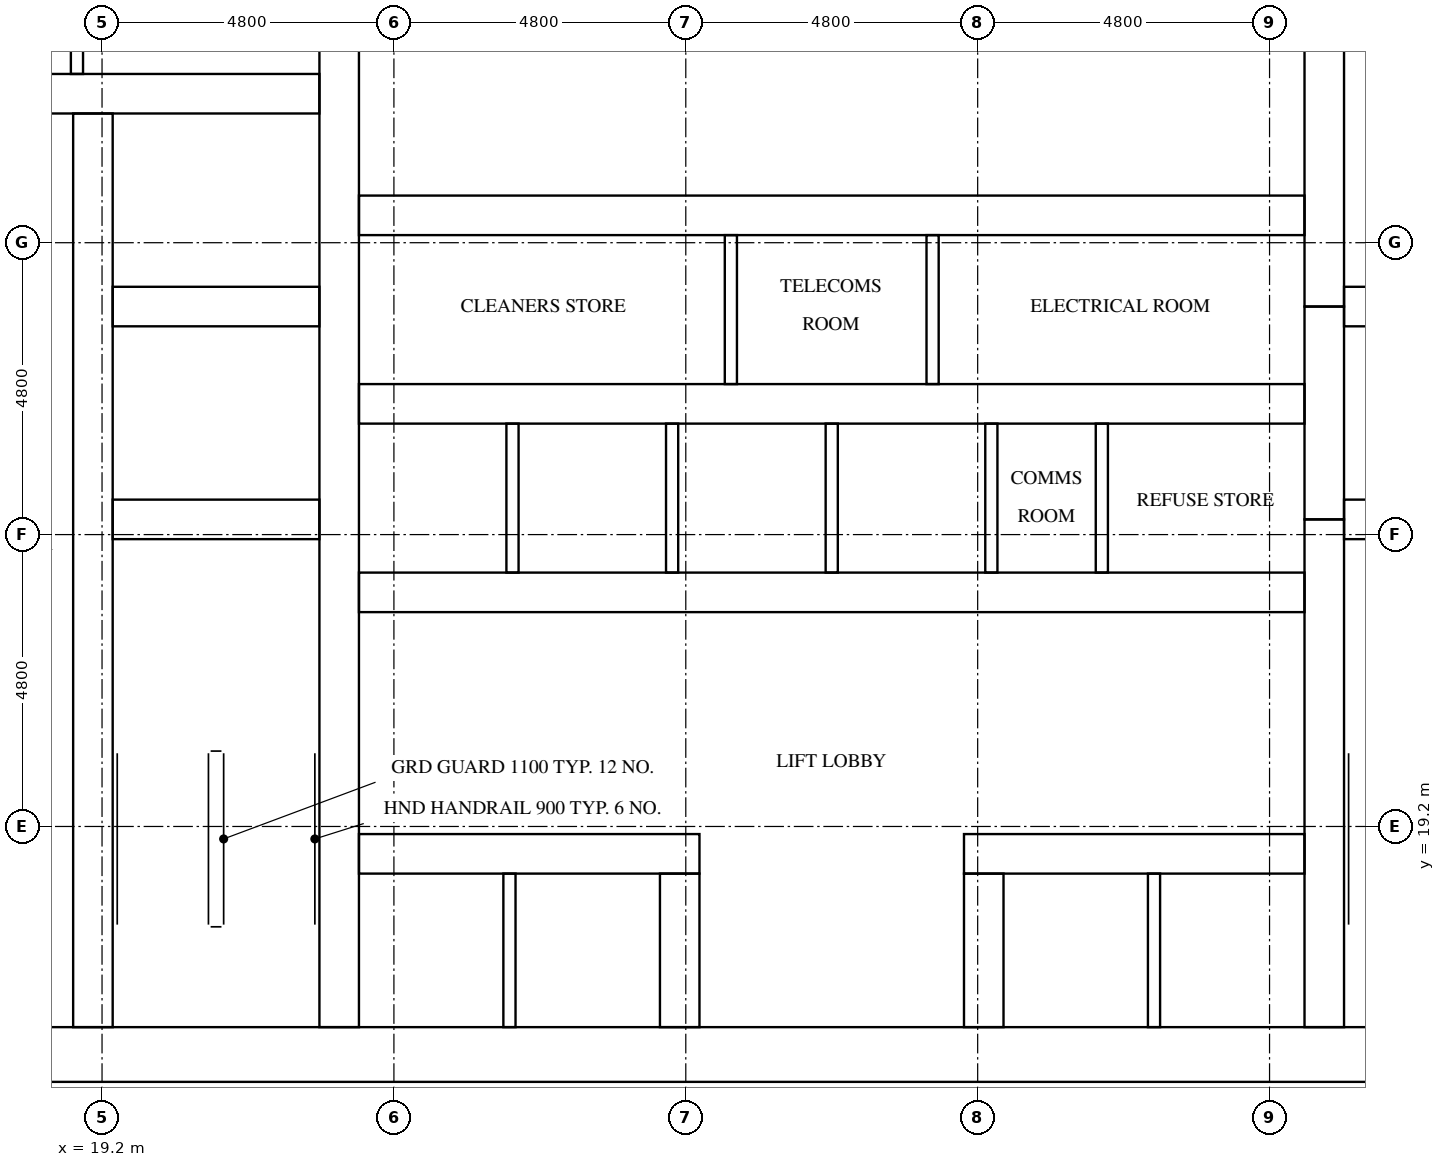
"""IFC4 building model, lengths in metres.
Left out: names, types, materials, properties, quantities, classifications, styles, units other than length and angle.
Written with IfcOpenShell. Run it as: python <this file> out.ifc"""

import sys

from ifc_helpers import new_model, si_unit, direction, frame, frame_2d, origin, place, context, subcontext, project, spatial, rectangle, extrude, element, fill, save


model = new_model("IFC4")
c1 = context("Model", 3, precision=1e-05, world=origin(), true_north=direction((0.0, 1.0)))
c2 = subcontext(c1, "Body", "Model", "MODEL_VIEW")
j1 = project(units=[si_unit("LENGTHUNIT", "METRE"), si_unit("PLANEANGLEUNIT", "RADIAN")], contexts=[c1])
p1 = place(None, origin())
s1 = spatial("IfcSite", under=j1, at=p1, CompositionType="ELEMENT")
p2 = place(p1, origin())
s2 = spatial("IfcBuilding", under=s1, at=p2, CompositionType="ELEMENT")
p3 = place(p2, frame((0.0, 0.0, 76.8)))
s3 = spatial("IfcBuildingStorey", under=s2, at=p3, CompositionType="ELEMENT", Elevation=76.8)
p4 = place(p3, frame((15.0, 15.45, 0.0), z_axis=(0.0, 0.0, 1.0), x_axis=(1.0, 0.0, 0.0)))
e1 = element("IfcWall", 1, at=p4, inside=s3, PredefinedType="SHEAR", context=c2, shape_type="SweptSolid", body=[
    extrude(rectangle(XDim=32.4, YDim=0.9, at=frame_2d((16.2, 0.0))), origin(), (0.0, 0.0, 1.0), 3.2),
])
p5 = place(p4, frame((15.3, 0.0, 0.0)))
e2 = element("IfcOpeningElement", 2, at=p5, cuts=e1, PredefinedType="OPENING", context=c2, shape_type="SweptSolid", body=[
    extrude(rectangle(XDim=1.8, YDim=2.1, at=frame_2d((0.9, 1.05))), frame((0.0, 0.46, 0.0), z_axis=(0.0, -1.0, 0.0), x_axis=(1.0, 0.0, 0.0)), (0.0, 0.0, 1.0), 0.92),
])
p6 = place(p3, frame((19.05, 15.9, 0.0), z_axis=(0.0, 0.0, 1.0), x_axis=(0.0, 1.0, 0.0)))
e3 = element("IfcWall", 3, at=p6, inside=s3, PredefinedType="SHEAR", context=c2, shape_type="SweptSolid", body=[
    extrude(rectangle(XDim=15.025, YDim=0.65, at=frame_2d((7.513, 0.0))), origin(), (0.0, 0.0, 1.0), 3.2),
])
p7 = place(p6, frame((9.55, 0.0, 0.0)))
e4 = element("IfcOpeningElement", 4, at=p7, cuts=e3, PredefinedType="OPENING", context=c2, shape_type="SweptSolid", body=[
    extrude(rectangle(XDim=1.1, YDim=2.1, at=frame_2d((0.55, 1.05))), frame((0.0, 0.335, 0.0), z_axis=(0.0, -1.0, 0.0), x_axis=(1.0, 0.0, 0.0)), (0.0, 0.0, 1.0), 0.67),
])
p8 = place(p6, frame((13.05, 0.0, 0.0)))
e5 = element("IfcOpeningElement", 5, at=p8, cuts=e3, PredefinedType="OPENING", context=c2, shape_type="SweptSolid", body=[
    extrude(rectangle(XDim=1.1, YDim=2.1, at=frame_2d((0.55, 1.05))), frame((0.0, 0.335, 0.0), z_axis=(0.0, -1.0, 0.0), x_axis=(1.0, 0.0, 0.0)), (0.0, 0.0, 1.0), 0.67),
])
p9 = place(p6, frame((0.3, 0.0, 0.0)))
e6 = element("IfcOpeningElement", 6, at=p9, cuts=e3, PredefinedType="OPENING", context=c2, shape_type="SweptSolid", body=[
    extrude(rectangle(XDim=1.2, YDim=2.1, at=frame_2d((0.6, 1.05))), frame((0.0, 0.335, 0.0), z_axis=(0.0, -1.0, 0.0), x_axis=(1.0, 0.0, 0.0)), (0.0, 0.0, 1.0), 0.67),
])
p10 = place(p3, frame((23.1, 15.9, 0.0), z_axis=(0.0, 0.0, 1.0), x_axis=(0.0, 1.0, 0.0)))
e7 = element("IfcWall", 7, at=p10, inside=s3, PredefinedType="SHEAR", context=c2, shape_type="SweptSolid", body=[
    extrude(rectangle(XDim=21.0, YDim=0.65, at=frame_2d((10.5, 0.0))), origin(), (0.0, 0.0, 1.0), 3.2),
])
p11 = place(p3, frame((39.3, 15.9, 0.0), z_axis=(0.0, 0.0, 1.0), x_axis=(0.0, 1.0, 0.0)))
e8 = element("IfcWall", 8, at=p11, inside=s3, PredefinedType="SHEAR", context=c2, shape_type="SweptSolid", body=[
    extrude(rectangle(XDim=8.35, YDim=0.65, at=frame_2d((4.175, 0.0))), origin(), (0.0, 0.0, 1.0), 3.2),
])
p12 = place(p3, frame((39.3, 24.25, 0.0), z_axis=(0.0, 0.0, 1.0), x_axis=(0.0, 1.0, 0.0)))
e9 = element("IfcWall", 9, at=p12, inside=s3, PredefinedType="SHEAR", context=c2, shape_type="SweptSolid", body=[
    extrude(rectangle(XDim=3.5, YDim=0.65, at=frame_2d((1.75, 0.0))), origin(), (0.0, 0.0, 1.0), 3.2),
])
p13 = place(p3, frame((39.3, 27.75, 0.0), z_axis=(0.0, 0.0, 1.0), x_axis=(0.0, 1.0, 0.0)))
e10 = element("IfcWall", 10, at=p13, inside=s3, PredefinedType="SHEAR", context=c2, shape_type="SweptSolid", body=[
    extrude(rectangle(XDim=9.15, YDim=0.65, at=frame_2d((4.575, 0.0))), origin(), (0.0, 0.0, 1.0), 3.2),
])
for number, where, z_axis, x_axis in (
    (11, (19.375, 24.25, 0.0), (0.0, 0.0, 1.0), (1.0, 0.0, 0.0)),
    (12, (19.375, 27.75, 0.0), (0.0, 0.0, 1.0), (1.0, 0.0, 0.0)),
):
    element("IfcWall", number, at=place(p3, frame(where, z_axis=z_axis, x_axis=x_axis)), inside=s3, PredefinedType="SHEAR", context=c2, shape_type="SweptSolid", body=[
        extrude(rectangle(XDim=3.4, YDim=0.65, at=frame_2d((1.7, 0.0))), origin(), (0.0, 0.0, 1.0), 3.2),
    ])
p14 = place(p3, frame((15.9, 31.25, 0.0), z_axis=(0.0, 0.0, 1.0), x_axis=(1.0, 0.0, 0.0)))
e13 = element("IfcWall", 13, at=p14, inside=s3, PredefinedType="SHEAR", context=c2, shape_type="SweptSolid", body=[
    extrude(rectangle(XDim=6.875, YDim=0.65, at=frame_2d((3.438, 0.0))), origin(), (0.0, 0.0, 1.0), 3.2),
])
for number, where, z_axis, x_axis in (
    (14, (39.625, 24.25, 0.0), (0.0, 0.0, 1.0), (1.0, 0.0, 0.0)),
    (15, (39.625, 27.75, 0.0), (0.0, 0.0, 1.0), (1.0, 0.0, 0.0)),
):
    element("IfcWall", number, at=place(p3, frame(where, z_axis=z_axis, x_axis=x_axis)), inside=s3, PredefinedType="SHEAR", context=c2, shape_type="SweptSolid", body=[
        extrude(rectangle(XDim=3.4, YDim=0.65, at=frame_2d((1.7, 0.0))), origin(), (0.0, 0.0, 1.0), 3.2),
    ])
p15 = place(p3, frame((23.425, 18.75, 0.0), z_axis=(0.0, 0.0, 1.0), x_axis=(1.0, 0.0, 0.0)))
e16 = element("IfcWall", 16, at=p15, inside=s3, PredefinedType="SHEAR", context=c2, shape_type="SweptSolid", body=[
    extrude(rectangle(XDim=5.6, YDim=0.65, at=frame_2d((2.8, 0.0))), origin(), (0.0, 0.0, 1.0), 3.2),
])
p16 = place(p15, frame((0.637, 0.0, 0.0)))
e17 = element("IfcOpeningElement", 17, at=p16, cuts=e16, PredefinedType="OPENING", context=c2, shape_type="SweptSolid", body=[
    extrude(rectangle(XDim=1.1, YDim=2.1, at=frame_2d((0.55, 1.05))), frame((0.0, 0.335, 0.0), z_axis=(0.0, -1.0, 0.0), x_axis=(1.0, 0.0, 0.0)), (0.0, 0.0, 1.0), 0.67),
])
p17 = place(p15, frame((3.212, 0.0, 0.0)))
e18 = element("IfcOpeningElement", 18, at=p17, cuts=e16, PredefinedType="OPENING", context=c2, shape_type="SweptSolid", body=[
    extrude(rectangle(XDim=1.1, YDim=2.1, at=frame_2d((0.55, 1.05))), frame((0.0, 0.335, 0.0), z_axis=(0.0, -1.0, 0.0), x_axis=(1.0, 0.0, 0.0)), (0.0, 0.0, 1.0), 0.67),
])
p18 = place(p3, frame((33.375, 18.75, 0.0), z_axis=(0.0, 0.0, 1.0), x_axis=(1.0, 0.0, 0.0)))
e19 = element("IfcWall", 19, at=p18, inside=s3, PredefinedType="SHEAR", context=c2, shape_type="SweptSolid", body=[
    extrude(rectangle(XDim=5.6, YDim=0.65, at=frame_2d((2.8, 0.0))), origin(), (0.0, 0.0, 1.0), 3.2),
])
p19 = place(p18, frame((1.288, 0.0, 0.0)))
e20 = element("IfcOpeningElement", 20, at=p19, cuts=e19, PredefinedType="OPENING", context=c2, shape_type="SweptSolid", body=[
    extrude(rectangle(XDim=1.1, YDim=2.1, at=frame_2d((0.55, 1.05))), frame((0.0, 0.335, 0.0), z_axis=(0.0, -1.0, 0.0), x_axis=(1.0, 0.0, 0.0)), (0.0, 0.0, 1.0), 0.67),
])
p20 = place(p18, frame((3.863, 0.0, 0.0)))
e21 = element("IfcOpeningElement", 21, at=p20, cuts=e19, PredefinedType="OPENING", context=c2, shape_type="SweptSolid", body=[
    extrude(rectangle(XDim=1.1, YDim=2.1, at=frame_2d((0.55, 1.05))), frame((0.0, 0.335, 0.0), z_axis=(0.0, -1.0, 0.0), x_axis=(1.0, 0.0, 0.0)), (0.0, 0.0, 1.0), 0.67),
])
p21 = place(p3, frame((23.425, 23.05, 0.0), z_axis=(0.0, 0.0, 1.0), x_axis=(1.0, 0.0, 0.0)))
e22 = element("IfcWall", 22, at=p21, inside=s3, PredefinedType="SHEAR", context=c2, shape_type="SweptSolid", body=[
    extrude(rectangle(XDim=15.55, YDim=0.65, at=frame_2d((7.775, 0.0))), origin(), (0.0, 0.0, 1.0), 3.2),
])
p22 = place(p21, frame((0.663, 0.0, 0.0)))
e23 = element("IfcOpeningElement", 23, at=p22, cuts=e22, PredefinedType="OPENING", context=c2, shape_type="SweptSolid", body=[
    extrude(rectangle(XDim=1.1, YDim=2.1, at=frame_2d((0.55, 1.05))), frame((0.0, 0.335, 0.0), z_axis=(0.0, -1.0, 0.0), x_axis=(1.0, 0.0, 0.0)), (0.0, 0.0, 1.0), 0.67),
])
p23 = place(p21, frame((3.288, 0.0, 0.0)))
e24 = element("IfcOpeningElement", 24, at=p23, cuts=e22, PredefinedType="OPENING", context=c2, shape_type="SweptSolid", body=[
    extrude(rectangle(XDim=1.1, YDim=2.1, at=frame_2d((0.55, 1.05))), frame((0.0, 0.335, 0.0), z_axis=(0.0, -1.0, 0.0), x_axis=(1.0, 0.0, 0.0)), (0.0, 0.0, 1.0), 0.67),
])
p24 = place(p21, frame((10.809, 0.0, 0.0)))
e25 = element("IfcOpeningElement", 25, at=p24, cuts=e22, PredefinedType="OPENING", context=c2, shape_type="SweptSolid", body=[
    extrude(rectangle(XDim=1.0, YDim=2.1, at=frame_2d((0.5, 1.05))), frame((0.0, 0.335, 0.0), z_axis=(0.0, -1.0, 0.0), x_axis=(1.0, 0.0, 0.0)), (0.0, 0.0, 1.0), 0.67),
])
p25 = place(p21, frame((13.434, 0.0, 0.0)))
e26 = element("IfcOpeningElement", 26, at=p25, cuts=e22, PredefinedType="OPENING", context=c2, shape_type="SweptSolid", body=[
    extrude(rectangle(XDim=1.0, YDim=2.1, at=frame_2d((0.5, 1.05))), frame((0.0, 0.335, 0.0), z_axis=(0.0, -1.0, 0.0), x_axis=(1.0, 0.0, 0.0)), (0.0, 0.0, 1.0), 0.67),
])
p26 = place(p3, frame((23.425, 26.15, 0.0), z_axis=(0.0, 0.0, 1.0), x_axis=(1.0, 0.0, 0.0)))
e27 = element("IfcWall", 27, at=p26, inside=s3, PredefinedType="SHEAR", context=c2, shape_type="SweptSolid", body=[
    extrude(rectangle(XDim=15.55, YDim=0.65, at=frame_2d((7.775, 0.0))), origin(), (0.0, 0.0, 1.0), 3.2),
])
p27 = place(p3, frame((23.425, 29.25, 0.0), z_axis=(0.0, 0.0, 1.0), x_axis=(1.0, 0.0, 0.0)))
e28 = element("IfcWall", 28, at=p27, inside=s3, PredefinedType="SHEAR", context=c2, shape_type="SweptSolid", body=[
    extrude(rectangle(XDim=15.55, YDim=0.65, at=frame_2d((7.775, 0.0))), origin(), (0.0, 0.0, 1.0), 3.2),
])
p28 = place(p27, frame((2.508, 0.0, 0.0)))
e29 = element("IfcOpeningElement", 29, at=p28, cuts=e28, PredefinedType="OPENING", context=c2, shape_type="SweptSolid", body=[
    extrude(rectangle(XDim=1.0, YDim=2.1, at=frame_2d((0.5, 1.05))), frame((0.0, 0.335, 0.0), z_axis=(0.0, -1.0, 0.0), x_axis=(1.0, 0.0, 0.0)), (0.0, 0.0, 1.0), 0.67),
])
p29 = place(p27, frame((7.275, 0.0, 0.0)))
e30 = element("IfcOpeningElement", 30, at=p29, cuts=e28, PredefinedType="OPENING", context=c2, shape_type="SweptSolid", body=[
    extrude(rectangle(XDim=1.0, YDim=2.1, at=frame_2d((0.5, 1.05))), frame((0.0, 0.335, 0.0), z_axis=(0.0, -1.0, 0.0), x_axis=(1.0, 0.0, 0.0)), (0.0, 0.0, 1.0), 0.67),
])
p30 = place(p27, frame((12.042, 0.0, 0.0)))
e31 = element("IfcOpeningElement", 31, at=p30, cuts=e28, PredefinedType="OPENING", context=c2, shape_type="SweptSolid", body=[
    extrude(rectangle(XDim=1.0, YDim=2.1, at=frame_2d((0.5, 1.05))), frame((0.0, 0.335, 0.0), z_axis=(0.0, -1.0, 0.0), x_axis=(1.0, 0.0, 0.0)), (0.0, 0.0, 1.0), 0.67),
])
for number, where, z_axis, x_axis in (
    (32, (28.7, 15.9, 0.0), (0.0, 0.0, 1.0), (0.0, 1.0, 0.0)),
    (33, (33.7, 15.9, 0.0), (0.0, 0.0, 1.0), (0.0, 1.0, 0.0)),
):
    element("IfcWall", number, at=place(p3, frame(where, z_axis=z_axis, x_axis=x_axis)), inside=s3, PredefinedType="SHEAR", context=c2, shape_type="SweptSolid", body=[
        extrude(rectangle(XDim=2.525, YDim=0.65, at=frame_2d((1.263, 0.0))), origin(), (0.0, 0.0, 1.0), 3.2),
    ])
for number, where, z_axis, x_axis in (
    (34, (25.95, 23.375, 0.0), (0.0, 0.0, 1.0), (0.0, 1.0, 0.0)),
    (35, (28.575, 23.375, 0.0), (0.0, 0.0, 1.0), (0.0, 1.0, 0.0)),
    (36, (31.2, 23.375, 0.0), (0.0, 0.0, 1.0), (0.0, 1.0, 0.0)),
    (37, (33.825, 23.375, 0.0), (0.0, 0.0, 1.0), (0.0, 1.0, 0.0)),
):
    element("IfcWall", number, at=place(p3, frame(where, z_axis=z_axis, x_axis=x_axis)), inside=s3, PredefinedType="SOLIDWALL", context=c2, shape_type="SweptSolid", body=[
        extrude(rectangle(XDim=2.45, YDim=0.2, at=frame_2d((1.225, 0.0))), origin(), (0.0, 0.0, 1.0), 3.2),
    ])
for number, where, z_axis, x_axis in (
    (38, (25.9, 15.9, 0.0), (0.0, 0.0, 1.0), (0.0, 1.0, 0.0)),
    (39, (36.5, 15.9, 0.0), (0.0, 0.0, 1.0), (0.0, 1.0, 0.0)),
):
    element("IfcWall", number, at=place(p3, frame(where, z_axis=z_axis, x_axis=x_axis)), inside=s3, PredefinedType="SOLIDWALL", context=c2, shape_type="SweptSolid", body=[
        extrude(rectangle(XDim=2.525, YDim=0.2, at=frame_2d((1.263, 0.0))), origin(), (0.0, 0.0, 1.0), 3.2),
    ])
p31 = place(p3, frame((18.788, 31.575, 0.0), z_axis=(0.0, 0.0, 1.0), x_axis=(0.0, 1.0, 0.0)))
e40 = element("IfcWall", 40, at=p31, inside=s3, PredefinedType="PARTITIONING", context=c2, shape_type="SweptSolid", body=[
    extrude(rectangle(XDim=5.325, YDim=0.2, at=frame_2d((2.663, 0.0))), origin(), (0.0, 0.0, 1.0), 3.2),
])
for number, where, z_axis, x_axis in (
    (41, (35.642, 23.375, 0.0), (0.0, 0.0, 1.0), (0.0, 1.0, 0.0)),
    (42, (29.541, 26.475, 0.0), (0.0, 0.0, 1.0), (0.0, 1.0, 0.0)),
    (43, (32.859, 26.475, 0.0), (0.0, 0.0, 1.0), (0.0, 1.0, 0.0)),
):
    element("IfcWall", number, at=place(p3, frame(where, z_axis=z_axis, x_axis=x_axis)), inside=s3, PredefinedType="PARTITIONING", context=c2, shape_type="SweptSolid", body=[
        extrude(rectangle(XDim=2.45, YDim=0.2, at=frame_2d((1.225, 0.0))), origin(), (0.0, 0.0, 1.0), 3.2),
    ])
p32 = place(p16, origin())
e44 = element("IfcDoor", 44, at=p32, inside=s3, OperationType="DOUBLE_DOOR_SLIDING", PredefinedType="DOOR", context=c2, shape_type="SweptSolid", body=[
    extrude(rectangle(XDim=1.1, YDim=2.1, at=frame_2d((0.55, 1.05))), frame((0.0, 0.025, 0.0), z_axis=(0.0, -1.0, 0.0), x_axis=(1.0, 0.0, 0.0)), (0.0, 0.0, 1.0), 0.05),
])
fill(e17, e44)
p33 = place(p17, origin())
e45 = element("IfcDoor", 45, at=p33, inside=s3, OperationType="DOUBLE_DOOR_SLIDING", PredefinedType="DOOR", context=c2, shape_type="SweptSolid", body=[
    extrude(rectangle(XDim=1.1, YDim=2.1, at=frame_2d((0.55, 1.05))), frame((0.0, 0.025, 0.0), z_axis=(0.0, -1.0, 0.0), x_axis=(1.0, 0.0, 0.0)), (0.0, 0.0, 1.0), 0.05),
])
fill(e18, e45)
p34 = place(p19, origin())
e46 = element("IfcDoor", 46, at=p34, inside=s3, OperationType="DOUBLE_DOOR_SLIDING", PredefinedType="DOOR", context=c2, shape_type="SweptSolid", body=[
    extrude(rectangle(XDim=1.1, YDim=2.1, at=frame_2d((0.55, 1.05))), frame((0.0, 0.025, 0.0), z_axis=(0.0, -1.0, 0.0), x_axis=(1.0, 0.0, 0.0)), (0.0, 0.0, 1.0), 0.05),
])
fill(e20, e46)
p35 = place(p20, origin())
e47 = element("IfcDoor", 47, at=p35, inside=s3, OperationType="DOUBLE_DOOR_SLIDING", PredefinedType="DOOR", context=c2, shape_type="SweptSolid", body=[
    extrude(rectangle(XDim=1.1, YDim=2.1, at=frame_2d((0.55, 1.05))), frame((0.0, 0.025, 0.0), z_axis=(0.0, -1.0, 0.0), x_axis=(1.0, 0.0, 0.0)), (0.0, 0.0, 1.0), 0.05),
])
fill(e21, e47)
p36 = place(p22, origin())
e48 = element("IfcDoor", 48, at=p36, inside=s3, OperationType="DOUBLE_DOOR_SLIDING", PredefinedType="DOOR", context=c2, shape_type="SweptSolid", body=[
    extrude(rectangle(XDim=1.1, YDim=2.1, at=frame_2d((0.55, 1.05))), frame((0.0, 0.025, 0.0), z_axis=(0.0, -1.0, 0.0), x_axis=(1.0, 0.0, 0.0)), (0.0, 0.0, 1.0), 0.05),
])
fill(e23, e48)
p37 = place(p23, origin())
e49 = element("IfcDoor", 49, at=p37, inside=s3, OperationType="DOUBLE_DOOR_SLIDING", PredefinedType="DOOR", context=c2, shape_type="SweptSolid", body=[
    extrude(rectangle(XDim=1.1, YDim=2.1, at=frame_2d((0.55, 1.05))), frame((0.0, 0.025, 0.0), z_axis=(0.0, -1.0, 0.0), x_axis=(1.0, 0.0, 0.0)), (0.0, 0.0, 1.0), 0.05),
])
fill(e24, e49)
p38 = place(p7, origin())
e50 = element("IfcDoor", 50, at=p38, inside=s3, OperationType="DOUBLE_DOOR_SLIDING", PredefinedType="DOOR", context=c2, shape_type="SweptSolid", body=[
    extrude(rectangle(XDim=1.1, YDim=2.1, at=frame_2d((0.55, 1.05))), frame((0.0, 0.025, 0.0), z_axis=(0.0, -1.0, 0.0), x_axis=(1.0, 0.0, 0.0)), (0.0, 0.0, 1.0), 0.05),
])
fill(e4, e50)
p39 = place(p8, origin())
e51 = element("IfcDoor", 51, at=p39, inside=s3, OperationType="DOUBLE_DOOR_SLIDING", PredefinedType="DOOR", context=c2, shape_type="SweptSolid", body=[
    extrude(rectangle(XDim=1.1, YDim=2.1, at=frame_2d((0.55, 1.05))), frame((0.0, 0.025, 0.0), z_axis=(0.0, -1.0, 0.0), x_axis=(1.0, 0.0, 0.0)), (0.0, 0.0, 1.0), 0.05),
])
fill(e5, e51)
p40 = place(p9, frame((1.2, 0.0, 0.0), z_axis=(0.0, 0.0, 1.0), x_axis=(-1.0, 0.0, 0.0)))
e52 = element("IfcDoor", 52, at=p40, inside=s3, OperationType="SINGLE_SWING_LEFT", PredefinedType="DOOR", context=c2, shape_type="SweptSolid", body=[
    extrude(rectangle(XDim=1.2, YDim=2.1, at=frame_2d((0.6, 1.05))), frame((0.0, 0.025, 0.0), z_axis=(0.0, -1.0, 0.0), x_axis=(1.0, 0.0, 0.0)), (0.0, 0.0, 1.0), 0.05),
])
fill(e6, e52)
p41 = place(p5, frame((1.8, 0.0, 0.0), z_axis=(0.0, 0.0, 1.0), x_axis=(-1.0, 0.0, 0.0)))
e53 = element("IfcDoor", 53, at=p41, inside=s3, OperationType="DOUBLE_DOOR_SINGLE_SWING", PredefinedType="DOOR", context=c2, shape_type="SweptSolid", body=[
    extrude(rectangle(XDim=1.8, YDim=2.1, at=frame_2d((0.9, 1.05))), frame((0.0, 0.025, 0.0), z_axis=(0.0, -1.0, 0.0), x_axis=(1.0, 0.0, 0.0)), (0.0, 0.0, 1.0), 0.05),
])
fill(e2, e53)
p42 = place(p24, frame((1.0, 0.0, 0.0), z_axis=(0.0, 0.0, 1.0), x_axis=(-1.0, 0.0, 0.0)))
e54 = element("IfcDoor", 54, at=p42, inside=s3, OperationType="SINGLE_SWING_RIGHT", PredefinedType="DOOR", context=c2, shape_type="SweptSolid", body=[
    extrude(rectangle(XDim=1.0, YDim=2.1, at=frame_2d((0.5, 1.05))), frame((0.0, 0.025, 0.0), z_axis=(0.0, -1.0, 0.0), x_axis=(1.0, 0.0, 0.0)), (0.0, 0.0, 1.0), 0.05),
])
fill(e25, e54)
p43 = place(p25, frame((1.0, 0.0, 0.0), z_axis=(0.0, 0.0, 1.0), x_axis=(-1.0, 0.0, 0.0)))
e55 = element("IfcDoor", 55, at=p43, inside=s3, OperationType="SINGLE_SWING_LEFT", PredefinedType="DOOR", context=c2, shape_type="SweptSolid", body=[
    extrude(rectangle(XDim=1.0, YDim=2.1, at=frame_2d((0.5, 1.05))), frame((0.0, 0.025, 0.0), z_axis=(0.0, -1.0, 0.0), x_axis=(1.0, 0.0, 0.0)), (0.0, 0.0, 1.0), 0.05),
])
fill(e26, e55)
p44 = place(p28, origin())
e56 = element("IfcDoor", 56, at=p44, inside=s3, OperationType="SINGLE_SWING_RIGHT", PredefinedType="DOOR", context=c2, shape_type="SweptSolid", body=[
    extrude(rectangle(XDim=1.0, YDim=2.1, at=frame_2d((0.5, 1.05))), frame((0.0, 0.025, 0.0), z_axis=(0.0, -1.0, 0.0), x_axis=(1.0, 0.0, 0.0)), (0.0, 0.0, 1.0), 0.05),
])
fill(e29, e56)
p45 = place(p29, origin())
e57 = element("IfcDoor", 57, at=p45, inside=s3, OperationType="SINGLE_SWING_LEFT", PredefinedType="DOOR", context=c2, shape_type="SweptSolid", body=[
    extrude(rectangle(XDim=1.0, YDim=2.1, at=frame_2d((0.5, 1.05))), frame((0.0, 0.025, 0.0), z_axis=(0.0, -1.0, 0.0), x_axis=(1.0, 0.0, 0.0)), (0.0, 0.0, 1.0), 0.05),
])
fill(e30, e57)
p46 = place(p30, origin())
e58 = element("IfcDoor", 58, at=p46, inside=s3, OperationType="SINGLE_SWING_RIGHT", PredefinedType="DOOR", context=c2, shape_type="SweptSolid", body=[
    extrude(rectangle(XDim=1.0, YDim=2.1, at=frame_2d((0.5, 1.05))), frame((0.0, 0.025, 0.0), z_axis=(0.0, -1.0, 0.0), x_axis=(1.0, 0.0, 0.0)), (0.0, 0.0, 1.0), 0.05),
])
fill(e31, e58)
save(model, sys.argv[1])
